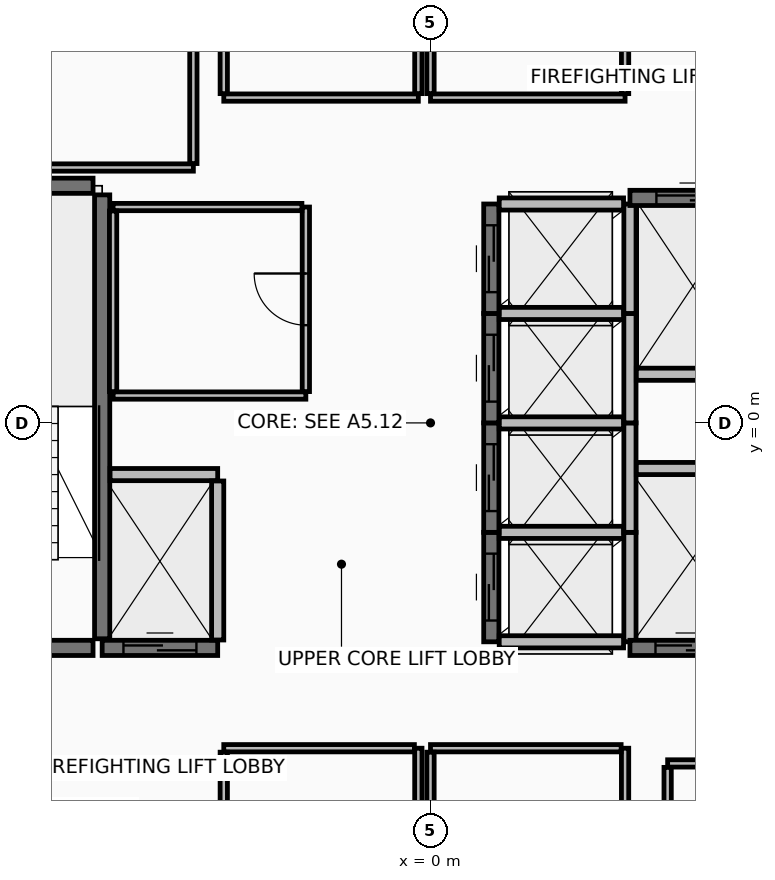
"""IFC4 building model, lengths in metres.
Left out: names, types, materials, properties, quantities, classifications, styles, units other than length and angle.
Written with IfcOpenShell. Run it as: python <this file> out.ifc"""

import sys

from ifc_helpers import new_model, si_unit, direction, frame, frame_2d, origin, place, context, subcontext, project, spatial, rectangle, extrude, element, fill, save


model = new_model("IFC4")
c1 = context("Model", 3, precision=1e-05, world=origin(), true_north=direction((0.0, 1.0)))
c2 = subcontext(c1, "Body", "Model", "MODEL_VIEW")
j1 = project(units=[si_unit("LENGTHUNIT", "METRE"), si_unit("PLANEANGLEUNIT", "RADIAN")], contexts=[c1])
p1 = place(None, origin())
s1 = spatial("IfcSite", under=j1, at=p1, CompositionType="ELEMENT")
p2 = place(p1, origin())
s2 = spatial("IfcBuilding", under=s1, at=p2, CompositionType="ELEMENT")
p3 = place(p2, frame((0.0, 0.0, 234.25)))
s3 = spatial("IfcBuildingStorey", under=s2, at=p3, CompositionType="ELEMENT", Elevation=234.25)
p4 = place(p3, frame((-5.4, -3.55, 0.0), z_axis=(0.0, 0.0, 1.0), x_axis=(0.0, 1.0, 0.0)))
e1 = element("IfcWall", 1, at=p4, inside=s3, PredefinedType="SHEAR", context=c2, shape_type="SweptSolid", body=[
    extrude(rectangle(XDim=7.3, YDim=0.25, at=frame_2d((3.65, 0.0))), origin(), (0.0, 0.0, 1.0), 3.42),
])
p5 = place(p3, frame((-8.5, -3.7, 0.0), z_axis=(0.0, 0.0, 1.0), x_axis=(1.0, 0.0, 0.0)))
e2 = element("IfcWall", 2, at=p5, inside=s3, PredefinedType="SHEAR", context=c2, shape_type="SweptSolid", body=[
    extrude(rectangle(XDim=2.95, YDim=0.25, at=frame_2d((1.475, 0.0))), origin(), (0.0, 0.0, 1.0), 3.42),
])
p6 = place(p5, frame((0.9, 0.0, 0.0)))
e3 = element("IfcOpeningElement", 3, at=p6, cuts=e2, PredefinedType="OPENING", context=c2, shape_type="SweptSolid", body=[
    extrude(rectangle(XDim=1.1, YDim=2.15, at=frame_2d((0.55, 1.075))), frame((0.0, 0.135, 0.0), z_axis=(0.0, -1.0, 0.0), x_axis=(1.0, 0.0, 0.0)), (0.0, 0.0, 1.0), 0.27),
])
p7 = place(p3, frame((-8.5, 3.9, 0.0), z_axis=(0.0, 0.0, 1.0), x_axis=(1.0, 0.0, 0.0)))
e4 = element("IfcWall", 4, at=p7, inside=s3, PredefinedType="SHEAR", context=c2, shape_type="SweptSolid", body=[
    extrude(rectangle(XDim=2.95, YDim=0.25, at=frame_2d((1.475, 0.0))), origin(), (0.0, 0.0, 1.0), 3.42),
])
p8 = place(p3, frame((1.0, -3.6, 0.0), z_axis=(0.0, 0.0, 1.0), x_axis=(0.0, 1.0, 0.0)))
e5 = element("IfcWall", 5, at=p8, inside=s3, PredefinedType="SHEAR", context=c2, shape_type="SweptSolid", body=[
    extrude(rectangle(XDim=1.8, YDim=0.25, at=frame_2d((0.9, 0.0))), origin(), (0.0, 0.0, 1.0), 3.42),
])
p9 = place(p8, frame((0.35, 0.0, 0.0)))
e6 = element("IfcOpeningElement", 6, at=p9, cuts=e5, PredefinedType="OPENING", context=c2, shape_type="SweptSolid", body=[
    extrude(rectangle(XDim=1.1, YDim=2.2, at=frame_2d((0.55, 1.1))), frame((0.0, 0.135, 0.0), z_axis=(0.0, -1.0, 0.0), x_axis=(1.0, 0.0, 0.0)), (0.0, 0.0, 1.0), 0.27),
])
p10 = place(p3, frame((3.28, -3.6, 0.0), z_axis=(0.0, 0.0, 1.0), x_axis=(0.0, 1.0, 0.0)))
e7 = element("IfcWall", 7, at=p10, inside=s3, PredefinedType="PARTITIONING", context=c2, shape_type="SweptSolid", body=[
    extrude(rectangle(XDim=1.8, YDim=0.2, at=frame_2d((0.9, 0.0))), origin(), (0.0, 0.0, 1.0), 3.42),
])
for number, where, z_axis, x_axis in (
    (8, (1.13, -3.6, 0.0), (0.0, 0.0, 1.0), (1.0, 0.0, 0.0)),
    (9, (1.13, -1.8, 0.0), (0.0, 0.0, 1.0), (1.0, 0.0, 0.0)),
):
    element("IfcWall", number, at=place(p3, frame(where, z_axis=z_axis, x_axis=x_axis)), inside=s3, PredefinedType="PARTITIONING", context=c2, shape_type="SweptSolid", body=[
        extrude(rectangle(XDim=2.045, YDim=0.2, at=frame_2d((1.022, 0.0))), origin(), (0.0, 0.0, 1.0), 3.42),
    ])
p11 = place(p3, frame((1.0, -1.8, 0.0), z_axis=(0.0, 0.0, 1.0), x_axis=(0.0, 1.0, 0.0)))
e10 = element("IfcWall", 10, at=p11, inside=s3, PredefinedType="SHEAR", context=c2, shape_type="SweptSolid", body=[
    extrude(rectangle(XDim=1.8, YDim=0.25, at=frame_2d((0.9, 0.0))), origin(), (0.0, 0.0, 1.0), 3.42),
])
p12 = place(p11, frame((0.35, 0.0, 0.0)))
e11 = element("IfcOpeningElement", 11, at=p12, cuts=e10, PredefinedType="OPENING", context=c2, shape_type="SweptSolid", body=[
    extrude(rectangle(XDim=1.1, YDim=2.2, at=frame_2d((0.55, 1.1))), frame((0.0, 0.135, 0.0), z_axis=(0.0, -1.0, 0.0), x_axis=(1.0, 0.0, 0.0)), (0.0, 0.0, 1.0), 0.27),
])
p13 = place(p3, frame((3.28, -1.8, 0.0), z_axis=(0.0, 0.0, 1.0), x_axis=(0.0, 1.0, 0.0)))
e12 = element("IfcWall", 12, at=p13, inside=s3, PredefinedType="PARTITIONING", context=c2, shape_type="SweptSolid", body=[
    extrude(rectangle(XDim=1.8, YDim=0.2, at=frame_2d((0.9, 0.0))), origin(), (0.0, 0.0, 1.0), 3.42),
])
p14 = place(p3, frame((1.13, 0.0, 0.0), z_axis=(0.0, 0.0, 1.0), x_axis=(1.0, 0.0, 0.0)))
e13 = element("IfcWall", 13, at=p14, inside=s3, PredefinedType="PARTITIONING", context=c2, shape_type="SweptSolid", body=[
    extrude(rectangle(XDim=2.045, YDim=0.2, at=frame_2d((1.022, 0.0))), origin(), (0.0, 0.0, 1.0), 3.42),
])
p15 = place(p3, frame((1.0, 0.0, 0.0), z_axis=(0.0, 0.0, 1.0), x_axis=(0.0, 1.0, 0.0)))
e14 = element("IfcWall", 14, at=p15, inside=s3, PredefinedType="SHEAR", context=c2, shape_type="SweptSolid", body=[
    extrude(rectangle(XDim=1.8, YDim=0.25, at=frame_2d((0.9, 0.0))), origin(), (0.0, 0.0, 1.0), 3.42),
])
p16 = place(p15, frame((0.35, 0.0, 0.0)))
e15 = element("IfcOpeningElement", 15, at=p16, cuts=e14, PredefinedType="OPENING", context=c2, shape_type="SweptSolid", body=[
    extrude(rectangle(XDim=1.1, YDim=2.2, at=frame_2d((0.55, 1.1))), frame((0.0, 0.135, 0.0), z_axis=(0.0, -1.0, 0.0), x_axis=(1.0, 0.0, 0.0)), (0.0, 0.0, 1.0), 0.27),
])
p17 = place(p3, frame((3.28, 0.0, 0.0), z_axis=(0.0, 0.0, 1.0), x_axis=(0.0, 1.0, 0.0)))
e16 = element("IfcWall", 16, at=p17, inside=s3, PredefinedType="PARTITIONING", context=c2, shape_type="SweptSolid", body=[
    extrude(rectangle(XDim=1.8, YDim=0.2, at=frame_2d((0.9, 0.0))), origin(), (0.0, 0.0, 1.0), 3.42),
])
p18 = place(p3, frame((1.13, 1.8, 0.0), z_axis=(0.0, 0.0, 1.0), x_axis=(1.0, 0.0, 0.0)))
e17 = element("IfcWall", 17, at=p18, inside=s3, PredefinedType="PARTITIONING", context=c2, shape_type="SweptSolid", body=[
    extrude(rectangle(XDim=2.045, YDim=0.2, at=frame_2d((1.022, 0.0))), origin(), (0.0, 0.0, 1.0), 3.42),
])
p19 = place(p3, frame((1.0, 1.8, 0.0), z_axis=(0.0, 0.0, 1.0), x_axis=(0.0, 1.0, 0.0)))
e18 = element("IfcWall", 18, at=p19, inside=s3, PredefinedType="SHEAR", context=c2, shape_type="SweptSolid", body=[
    extrude(rectangle(XDim=1.8, YDim=0.25, at=frame_2d((0.9, 0.0))), origin(), (0.0, 0.0, 1.0), 3.42),
])
p20 = place(p19, frame((0.35, 0.0, 0.0)))
e19 = element("IfcOpeningElement", 19, at=p20, cuts=e18, PredefinedType="OPENING", context=c2, shape_type="SweptSolid", body=[
    extrude(rectangle(XDim=1.1, YDim=2.2, at=frame_2d((0.55, 1.1))), frame((0.0, 0.135, 0.0), z_axis=(0.0, -1.0, 0.0), x_axis=(1.0, 0.0, 0.0)), (0.0, 0.0, 1.0), 0.27),
])
p21 = place(p3, frame((3.28, 1.8, 0.0), z_axis=(0.0, 0.0, 1.0), x_axis=(0.0, 1.0, 0.0)))
e20 = element("IfcWall", 20, at=p21, inside=s3, PredefinedType="PARTITIONING", context=c2, shape_type="SweptSolid", body=[
    extrude(rectangle(XDim=1.8, YDim=0.2, at=frame_2d((0.9, 0.0))), origin(), (0.0, 0.0, 1.0), 3.42),
])
p22 = place(p3, frame((1.13, 3.6, 0.0), z_axis=(0.0, 0.0, 1.0), x_axis=(1.0, 0.0, 0.0)))
e21 = element("IfcWall", 21, at=p22, inside=s3, PredefinedType="PARTITIONING", context=c2, shape_type="SweptSolid", body=[
    extrude(rectangle(XDim=2.045, YDim=0.2, at=frame_2d((1.022, 0.0))), origin(), (0.0, 0.0, 1.0), 2.715),
])
p23 = place(p3, frame((-5.4, -3.7, 0.0), z_axis=(0.0, 0.0, 1.0), x_axis=(1.0, 0.0, 0.0)))
e22 = element("IfcWall", 22, at=p23, inside=s3, PredefinedType="SHEAR", context=c2, shape_type="SweptSolid", body=[
    extrude(rectangle(XDim=1.9, YDim=0.25, at=frame_2d((0.95, 0.0))), origin(), (0.0, 0.0, 1.0), 3.42),
])
p24 = place(p23, frame((0.35, 0.0, 0.0)))
e23 = element("IfcOpeningElement", 23, at=p24, cuts=e22, PredefinedType="OPENING", context=c2, shape_type="SweptSolid", body=[
    extrude(rectangle(XDim=1.2, YDim=2.2, at=frame_2d((0.6, 1.1))), frame((0.0, 0.135, 0.0), z_axis=(0.0, -1.0, 0.0), x_axis=(1.0, 0.0, 0.0)), (0.0, 0.0, 1.0), 0.27),
])
p25 = place(p3, frame((-5.27, -0.85, 0.0), z_axis=(0.0, 0.0, 1.0), x_axis=(1.0, 0.0, 0.0)))
e24 = element("IfcWall", 24, at=p25, inside=s3, PredefinedType="PARTITIONING", context=c2, shape_type="SweptSolid", body=[
    extrude(rectangle(XDim=1.77, YDim=0.2, at=frame_2d((0.885, 0.0))), origin(), (0.0, 0.0, 1.0), 3.42),
])
p26 = place(p3, frame((-3.5, -3.57, 0.0), z_axis=(0.0, 0.0, 1.0), x_axis=(0.0, 1.0, 0.0)))
e25 = element("IfcWall", 25, at=p26, inside=s3, PredefinedType="PARTITIONING", context=c2, shape_type="SweptSolid", body=[
    extrude(rectangle(XDim=2.615, YDim=0.2, at=frame_2d((1.308, 0.0))), origin(), (0.0, 0.0, 1.0), 3.42),
])
p27 = place(p3, frame((3.28, 3.7, 0.0), z_axis=(0.0, 0.0, 1.0), x_axis=(1.0, 0.0, 0.0)))
e26 = element("IfcWall", 26, at=p27, inside=s3, PredefinedType="SHEAR", context=c2, shape_type="SweptSolid", body=[
    extrude(rectangle(XDim=2.07, YDim=0.25, at=frame_2d((1.035, 0.0))), origin(), (0.0, 0.0, 1.0), 3.42),
])
p28 = place(p27, frame((0.435, 0.0, 0.0)))
e27 = element("IfcOpeningElement", 27, at=p28, cuts=e26, PredefinedType="OPENING", context=c2, shape_type="SweptSolid", body=[
    extrude(rectangle(XDim=1.2, YDim=2.2, at=frame_2d((0.6, 1.1))), frame((0.0, 0.135, 0.0), z_axis=(0.0, -1.0, 0.0), x_axis=(1.0, 0.0, 0.0)), (0.0, 0.0, 1.0), 0.27),
])
p29 = place(p3, frame((3.385, 0.8, 0.0), z_axis=(0.0, 0.0, 1.0), x_axis=(1.0, 0.0, 0.0)))
e28 = element("IfcWall", 28, at=p29, inside=s3, PredefinedType="PARTITIONING", context=c2, shape_type="SweptSolid", body=[
    extrude(rectangle(XDim=1.835, YDim=0.2, at=frame_2d((0.917, 0.0))), origin(), (0.0, 0.0, 1.0), 3.42),
])
p30 = place(p3, frame((3.28, -3.7, 0.0), z_axis=(0.0, 0.0, 1.0), x_axis=(1.0, 0.0, 0.0)))
e29 = element("IfcWall", 29, at=p30, inside=s3, PredefinedType="SHEAR", context=c2, shape_type="SweptSolid", body=[
    extrude(rectangle(XDim=1.94, YDim=0.25, at=frame_2d((0.97, 0.0))), origin(), (0.0, 0.0, 1.0), 3.42),
])
p31 = place(p30, frame((0.42, 0.0, 0.0)))
e30 = element("IfcOpeningElement", 30, at=p31, cuts=e29, PredefinedType="OPENING", context=c2, shape_type="SweptSolid", body=[
    extrude(rectangle(XDim=1.1, YDim=2.2, at=frame_2d((0.55, 1.1))), frame((0.0, 0.135, 0.0), z_axis=(0.0, -1.0, 0.0), x_axis=(1.0, 0.0, 0.0)), (0.0, 0.0, 1.0), 0.27),
])
p32 = place(p3, frame((3.385, -0.75, 0.0), z_axis=(0.0, 0.0, 1.0), x_axis=(1.0, 0.0, 0.0)))
e31 = element("IfcWall", 31, at=p32, inside=s3, PredefinedType="PARTITIONING", context=c2, shape_type="SweptSolid", body=[
    extrude(rectangle(XDim=1.835, YDim=0.2, at=frame_2d((0.917, 0.0))), origin(), (0.0, 0.0, 1.0), 3.42),
])
p33 = place(p3, frame((-5.22, 0.45, 0.0), z_axis=(0.0, 0.0, 1.0), x_axis=(1.0, 0.0, 0.0)))
e32 = element("IfcWall", 32, at=p33, inside=s3, PredefinedType="PARTITIONING", context=c2, shape_type="SweptSolid", body=[
    extrude(rectangle(XDim=3.17, YDim=0.12, at=frame_2d((1.585, 0.0))), origin(), (0.0, 0.0, 1.0), 3.42),
])
p34 = place(p3, frame((-2.05, 0.515, 0.0), z_axis=(0.0, 0.0, 1.0), x_axis=(0.0, 1.0, 0.0)))
e33 = element("IfcWall", 33, at=p34, inside=s3, PredefinedType="PARTITIONING", context=c2, shape_type="SweptSolid", body=[
    extrude(rectangle(XDim=3.035, YDim=0.12, at=frame_2d((1.518, 0.0))), origin(), (0.0, 0.0, 1.0), 3.42),
])
p35 = place(p34, frame((1.092, 0.0, 0.0)))
e34 = element("IfcOpeningElement", 34, at=p35, cuts=e33, PredefinedType="OPENING", context=c2, shape_type="SweptSolid", body=[
    extrude(rectangle(XDim=0.85, YDim=2.1, at=frame_2d((0.425, 1.05))), frame((0.0, 0.07, 0.0), z_axis=(0.0, -1.0, 0.0), x_axis=(1.0, 0.0, 0.0)), (0.0, 0.0, 1.0), 0.14),
])
p36 = place(p3, frame((-2.115, 3.55, 0.0), z_axis=(0.0, 0.0, 1.0), x_axis=(-1.0, 0.0, 0.0)))
e35 = element("IfcWall", 35, at=p36, inside=s3, PredefinedType="PARTITIONING", context=c2, shape_type="SweptSolid", body=[
    extrude(rectangle(XDim=3.105, YDim=0.12, at=frame_2d((1.552, 0.0))), origin(), (0.0, 0.0, 1.0), 3.42),
])
p37 = place(p3, frame((-5.22, 3.485, 0.0), z_axis=(0.0, 0.0, 1.0), x_axis=(0.0, -1.0, 0.0)))
e36 = element("IfcWall", 36, at=p37, inside=s3, PredefinedType="PARTITIONING", context=c2, shape_type="SweptSolid", body=[
    extrude(rectangle(XDim=2.97, YDim=0.12, at=frame_2d((1.485, 0.0))), origin(), (0.0, 0.0, 1.0), 3.42),
])
p38 = place(p3, frame((-0.2, -7.42, 0.0), z_axis=(0.0, 0.0, 1.0), x_axis=(0.0, 1.0, 0.0)))
e37 = element("IfcWall", 37, at=p38, inside=s3, PredefinedType="PARTITIONING", context=c2, shape_type="SweptSolid", body=[
    extrude(rectangle(XDim=2.07, YDim=0.12, at=frame_2d((1.035, 0.0))), origin(), (0.0, 0.0, 1.0), 2.715),
])
p39 = place(p3, frame((-0.265, -5.35, 0.0), z_axis=(0.0, 0.0, 1.0), x_axis=(-1.0, 0.0, 0.0)))
e38 = element("IfcWall", 38, at=p39, inside=s3, PredefinedType="PARTITIONING", context=c2, shape_type="SweptSolid", body=[
    extrude(rectangle(XDim=3.135, YDim=0.12, at=frame_2d((1.567, 0.0))), origin(), (0.0, 0.0, 1.0), 2.715),
])
p40 = place(p3, frame((-3.4, -5.415, 0.0), z_axis=(0.0, 0.0, 1.0), x_axis=(0.0, -1.0, 0.0)))
e39 = element("IfcWall", 39, at=p40, inside=s3, PredefinedType="PARTITIONING", context=c2, shape_type="SweptSolid", body=[
    extrude(rectangle(XDim=2.8, YDim=0.12, at=frame_2d((1.4, 0.0))), origin(), (0.0, 0.0, 1.0), 2.715),
])
p41 = place(p3, frame((3.2, -8.215, 0.0), z_axis=(0.0, 0.0, 1.0), x_axis=(0.0, 1.0, 0.0)))
e40 = element("IfcWall", 40, at=p41, inside=s3, PredefinedType="PARTITIONING", context=c2, shape_type="SweptSolid", body=[
    extrude(rectangle(XDim=2.865, YDim=0.12, at=frame_2d((1.433, 0.0))), origin(), (0.0, 0.0, 1.0), 2.715),
])
p42 = place(p3, frame((3.135, -5.35, 0.0), z_axis=(0.0, 0.0, 1.0), x_axis=(-1.0, 0.0, 0.0)))
e41 = element("IfcWall", 41, at=p42, inside=s3, PredefinedType="PARTITIONING", context=c2, shape_type="SweptSolid", body=[
    extrude(rectangle(XDim=3.135, YDim=0.12, at=frame_2d((1.567, 0.0))), origin(), (0.0, 0.0, 1.0), 3.42),
])
p43 = place(p3, frame((0.0, -5.415, 0.0), z_axis=(0.0, 0.0, 1.0), x_axis=(0.0, -1.0, 0.0)))
e42 = element("IfcWall", 42, at=p43, inside=s3, PredefinedType="PARTITIONING", context=c2, shape_type="SweptSolid", body=[
    extrude(rectangle(XDim=2.005, YDim=0.12, at=frame_2d((1.002, 0.0))), origin(), (0.0, 0.0, 1.0), 2.715),
])
p44 = place(p3, frame((-3.4, 5.35, 0.0), z_axis=(0.0, 0.0, 1.0), x_axis=(1.0, 0.0, 0.0)))
e43 = element("IfcWall", 43, at=p44, inside=s3, PredefinedType="PARTITIONING", context=c2, shape_type="SweptSolid", body=[
    extrude(rectangle(XDim=3.2, YDim=0.12, at=frame_2d((1.6, 0.0))), origin(), (0.0, 0.0, 1.0), 3.42),
])
p45 = place(p3, frame((-0.2, 5.415, 0.0), z_axis=(0.0, 0.0, 1.0), x_axis=(0.0, 1.0, 0.0)))
e44 = element("IfcWall", 44, at=p45, inside=s3, PredefinedType="PARTITIONING", context=c2, shape_type="SweptSolid", body=[
    extrude(rectangle(XDim=2.005, YDim=0.12, at=frame_2d((1.002, 0.0))), origin(), (0.0, 0.0, 1.0), 2.715),
])
p46 = place(p3, frame((-3.4, 8.215, 0.0), z_axis=(0.0, 0.0, 1.0), x_axis=(0.0, -1.0, 0.0)))
e45 = element("IfcWall", 45, at=p46, inside=s3, PredefinedType="PARTITIONING", context=c2, shape_type="SweptSolid", body=[
    extrude(rectangle(XDim=2.8, YDim=0.12, at=frame_2d((1.4, 0.0))), origin(), (0.0, 0.0, 1.0), 2.715),
])
p47 = place(p3, frame((0.0, 5.35, 0.0), z_axis=(0.0, 0.0, 1.0), x_axis=(1.0, 0.0, 0.0)))
e46 = element("IfcWall", 46, at=p47, inside=s3, PredefinedType="PARTITIONING", context=c2, shape_type="SweptSolid", body=[
    extrude(rectangle(XDim=3.2, YDim=0.12, at=frame_2d((1.6, 0.0))), origin(), (0.0, 0.0, 1.0), 2.715),
])
p48 = place(p3, frame((3.2, 5.415, 0.0), z_axis=(0.0, 0.0, 1.0), x_axis=(0.0, 1.0, 0.0)))
e47 = element("IfcWall", 47, at=p48, inside=s3, PredefinedType="PARTITIONING", context=c2, shape_type="SweptSolid", body=[
    extrude(rectangle(XDim=2.8, YDim=0.12, at=frame_2d((1.4, 0.0))), origin(), (0.0, 0.0, 1.0), 2.715),
])
p49 = place(p3, frame((0.0, 7.42, 0.0), z_axis=(0.0, 0.0, 1.0), x_axis=(0.0, -1.0, 0.0)))
e48 = element("IfcWall", 48, at=p49, inside=s3, PredefinedType="PARTITIONING", context=c2, shape_type="SweptSolid", body=[
    extrude(rectangle(XDim=2.005, YDim=0.12, at=frame_2d((1.002, 0.0))), origin(), (0.0, 0.0, 1.0), 2.715),
])
p50 = place(p3, frame((-6.35, 4.2, 0.0), z_axis=(0.0, 0.0, 1.0), x_axis=(1.0, 0.0, 0.0)))
e49 = element("IfcWall", 49, at=p50, inside=s3, PredefinedType="PARTITIONING", context=c2, shape_type="SweptSolid", body=[
    extrude(rectangle(XDim=2.45, YDim=0.12, at=frame_2d((1.225, 0.0))), origin(), (0.0, 0.0, 1.0), 3.42),
])
p51 = place(p3, frame((-3.9, 4.265, 0.0), z_axis=(0.0, 0.0, 1.0), x_axis=(0.0, 1.0, 0.0)))
e50 = element("IfcWall", 50, at=p51, inside=s3, PredefinedType="PARTITIONING", context=c2, shape_type="SweptSolid", body=[
    extrude(rectangle(XDim=3.95, YDim=0.12, at=frame_2d((1.975, 0.0))), origin(), (0.0, 0.0, 1.0), 2.715),
])
p52 = place(p3, frame((5.635, -5.6, 0.0), z_axis=(0.0, 0.0, 1.0), x_axis=(-1.0, 0.0, 0.0)))
e51 = element("IfcWall", 51, at=p52, inside=s3, PredefinedType="PARTITIONING", context=c2, shape_type="SweptSolid", body=[
    extrude(rectangle(XDim=1.735, YDim=0.12, at=frame_2d((0.868, 0.0))), origin(), (0.0, 0.0, 1.0), 3.42),
])
p53 = place(p3, frame((3.9, -5.665, 0.0), z_axis=(0.0, 0.0, 1.0), x_axis=(0.0, -1.0, 0.0)))
e52 = element("IfcWall", 52, at=p53, inside=s3, PredefinedType="PARTITIONING", context=c2, shape_type="SweptSolid", body=[
    extrude(rectangle(XDim=2.55, YDim=0.12, at=frame_2d((1.275, 0.0))), origin(), (0.0, 0.0, 1.0), 2.715),
])
p54 = place(p9, origin())
e53 = element("IfcDoor", 53, at=p54, inside=s3, OperationType="SLIDING_TO_LEFT", PredefinedType="DOOR", context=c2, shape_type="SweptSolid", body=[
    extrude(rectangle(XDim=1.1, YDim=2.2, at=frame_2d((0.55, 1.1))), frame((0.0, 0.025, 0.0), z_axis=(0.0, -1.0, 0.0), x_axis=(1.0, 0.0, 0.0)), (0.0, 0.0, 1.0), 0.05),
])
fill(e6, e53)
p55 = place(p12, origin())
e54 = element("IfcDoor", 54, at=p55, inside=s3, OperationType="SLIDING_TO_LEFT", PredefinedType="DOOR", context=c2, shape_type="SweptSolid", body=[
    extrude(rectangle(XDim=1.1, YDim=2.2, at=frame_2d((0.55, 1.1))), frame((0.0, 0.025, 0.0), z_axis=(0.0, -1.0, 0.0), x_axis=(1.0, 0.0, 0.0)), (0.0, 0.0, 1.0), 0.05),
])
fill(e11, e54)
p56 = place(p16, origin())
e55 = element("IfcDoor", 55, at=p56, inside=s3, OperationType="SLIDING_TO_LEFT", PredefinedType="DOOR", context=c2, shape_type="SweptSolid", body=[
    extrude(rectangle(XDim=1.1, YDim=2.2, at=frame_2d((0.55, 1.1))), frame((0.0, 0.025, 0.0), z_axis=(0.0, -1.0, 0.0), x_axis=(1.0, 0.0, 0.0)), (0.0, 0.0, 1.0), 0.05),
])
fill(e15, e55)
p57 = place(p20, origin())
e56 = element("IfcDoor", 56, at=p57, inside=s3, OperationType="SLIDING_TO_LEFT", PredefinedType="DOOR", context=c2, shape_type="SweptSolid", body=[
    extrude(rectangle(XDim=1.1, YDim=2.2, at=frame_2d((0.55, 1.1))), frame((0.0, 0.025, 0.0), z_axis=(0.0, -1.0, 0.0), x_axis=(1.0, 0.0, 0.0)), (0.0, 0.0, 1.0), 0.05),
])
fill(e19, e56)
p58 = place(p24, origin())
e57 = element("IfcDoor", 57, at=p58, inside=s3, OperationType="SLIDING_TO_RIGHT", PredefinedType="DOOR", context=c2, shape_type="SweptSolid", body=[
    extrude(rectangle(XDim=1.2, YDim=2.2, at=frame_2d((0.6, 1.1))), frame((0.0, 0.025, 0.0), z_axis=(0.0, -1.0, 0.0), x_axis=(1.0, 0.0, 0.0)), (0.0, 0.0, 1.0), 0.05),
])
fill(e23, e57)
p59 = place(p28, origin())
e58 = element("IfcDoor", 58, at=p59, inside=s3, OperationType="SLIDING_TO_RIGHT", PredefinedType="DOOR", context=c2, shape_type="SweptSolid", body=[
    extrude(rectangle(XDim=1.2, YDim=2.2, at=frame_2d((0.6, 1.1))), frame((0.0, 0.025, 0.0), z_axis=(0.0, -1.0, 0.0), x_axis=(1.0, 0.0, 0.0)), (0.0, 0.0, 1.0), 0.05),
])
fill(e27, e58)
p60 = place(p31, origin())
e59 = element("IfcDoor", 59, at=p60, inside=s3, OperationType="SLIDING_TO_LEFT", PredefinedType="DOOR", context=c2, shape_type="SweptSolid", body=[
    extrude(rectangle(XDim=1.1, YDim=2.2, at=frame_2d((0.55, 1.1))), frame((0.0, 0.025, 0.0), z_axis=(0.0, -1.0, 0.0), x_axis=(1.0, 0.0, 0.0)), (0.0, 0.0, 1.0), 0.05),
])
fill(e30, e59)
p61 = place(p35, frame((0.85, 0.0, 0.0), z_axis=(0.0, 0.0, 1.0), x_axis=(-1.0, 0.0, 0.0)))
e60 = element("IfcDoor", 60, at=p61, inside=s3, OperationType="SINGLE_SWING_RIGHT", PredefinedType="DOOR", context=c2, shape_type="SweptSolid", body=[
    extrude(rectangle(XDim=0.85, YDim=2.1, at=frame_2d((0.425, 1.05))), frame((0.0, 0.025, 0.0), z_axis=(0.0, -1.0, 0.0), x_axis=(1.0, 0.0, 0.0)), (0.0, 0.0, 1.0), 0.05),
])
fill(e34, e60)
save(model, sys.argv[1])
